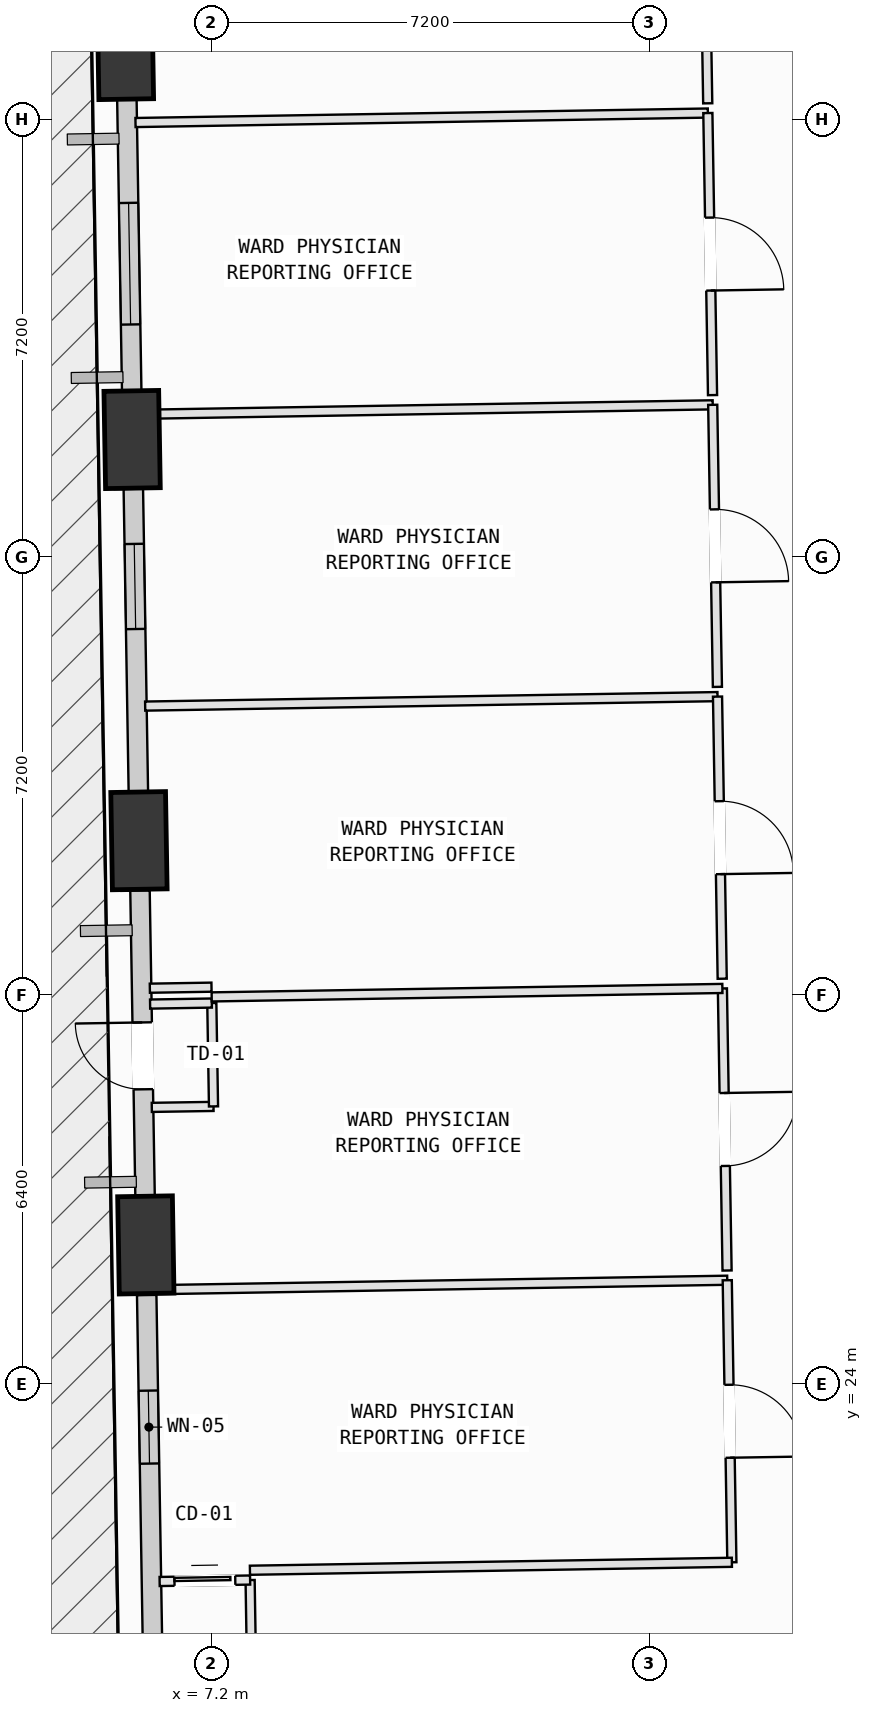
"""IFC4 building model, lengths in metres.
Left out: names, types, materials, properties, quantities, classifications, styles, units other than length and angle.
Written with IfcOpenShell. Run it as: python <this file> out.ifc"""

import sys

from ifc_helpers import new_model, si_unit, direction, frame, frame_2d, origin, origin_2d, place, context, subcontext, project, spatial, rectangle, extrude, element, fill, save


model = new_model("IFC4")
c1 = context("Model", 3, precision=1e-05, world=origin(), true_north=direction((0.0, 1.0)))
c2 = subcontext(c1, "Body", "Model", "MODEL_VIEW")
j1 = project(units=[si_unit("LENGTHUNIT", "METRE"), si_unit("PLANEANGLEUNIT", "RADIAN")], contexts=[c1])
p1 = place(None, origin())
s1 = spatial("IfcSite", under=j1, at=p1, CompositionType="ELEMENT")
p2 = place(p1, origin())
s2 = spatial("IfcBuilding", under=s1, at=p2, CompositionType="ELEMENT")
p3 = place(p2, frame((0.0, 0.0, 27.0)))
s3 = spatial("IfcBuildingStorey", under=s2, at=p3, CompositionType="ELEMENT", Elevation=27.0)
p4 = place(p3, frame((5.785, 45.928, 0.118), z_axis=(-0.085809994835, -0.114766197736, 0.98967942519), x_axis=(0.579277175858, 0.802439382746, 0.143279414254)))
e1 = element("IfcColumn", 1, at=p4, inside=s3, PredefinedType="COLUMN", context=c2, shape_type="SweptSolid", body=[
    extrude(rectangle(XDim=1.6, YDim=0.9, at=origin_2d()), origin(), (0.0, 0.0, 1.0), 3.921),
])
p5 = place(p3, frame((5.895, 39.531, 0.107), z_axis=(-0.059660635977, -0.114344368014, 0.991648109976), x_axis=(0.443956682583, 0.886720367742, 0.128955238049)))
e2 = element("IfcColumn", 2, at=p5, inside=s3, PredefinedType="COLUMN", context=c2, shape_type="SweptSolid", body=[
    extrude(rectangle(XDim=1.6, YDim=0.9, at=origin_2d()), origin(), (0.0, 0.0, 1.0), 3.924),
])
p6 = place(p3, frame((6.008, 32.932, 0.098), z_axis=(-0.032570607455, -0.11381065315, 0.992968423848), x_axis=(0.257225027096, 0.959075298635, 0.11836324169)))
e3 = element("IfcColumn", 3, at=p6, inside=s3, PredefinedType="COLUMN", context=c2, shape_type="SweptSolid", body=[
    extrude(rectangle(XDim=1.6, YDim=0.9, at=origin_2d()), origin(), (0.0, 0.0, 1.0), 3.928),
])
p7 = place(p3, frame((6.121, 26.284, 0.094), z_axis=(-0.005218792741, -0.113198099685, 0.99355873225), x_axis=(0.029189051615, 0.993131654715, 0.113302761082)))
e4 = element("IfcColumn", 4, at=p7, inside=s3, PredefinedType="COLUMN", context=c2, shape_type="SweptSolid", body=[
    extrude(rectangle(XDim=1.6, YDim=0.9, at=origin_2d()), origin(), (0.0, 0.0, 1.0), 3.93),
])
p8 = place(p3, frame((5.896, 39.909, 0.0), z_axis=(0.0, 0.0, 1.0), x_axis=(-0.016593479648, 0.999862318739, 0.0)))
e5 = element("IfcWall", 5, at=p8, inside=s3, PredefinedType="SOLIDWALL", context=c2, shape_type="SweptSolid", body=[
    extrude(rectangle(XDim=5.223, YDim=0.32, at=frame_2d((2.612, 0.0))), origin(), (0.0, 0.0, 1.0), 3.165),
])
p9 = place(p8, frame((1.513, 0.0, 0.75)))
e6 = element("IfcOpeningElement", 6, at=p9, cuts=e5, PredefinedType="OPENING", context=c2, shape_type="SweptSolid", body=[
    extrude(rectangle(XDim=2.0, YDim=1.95, at=frame_2d((1.0, 0.975))), frame((0.0, 0.17, 0.0), z_axis=(0.0, -1.0, 0.0), x_axis=(1.0, 0.0, 0.0)), (0.0, 0.0, 1.0), 0.34),
])
p10 = place(p3, frame((6.005, 33.319, 0.0), z_axis=(0.0, 0.0, 1.0), x_axis=(-0.016590536617, 0.999862367576, 0.0)))
e7 = element("IfcWall", 7, at=p10, inside=s3, PredefinedType="SOLIDWALL", context=c2, shape_type="SweptSolid", body=[
    extrude(rectangle(XDim=5.401, YDim=0.32, at=frame_2d((2.7, 0.0))), origin(), (0.0, 0.0, 1.0), 2.765),
])
p11 = place(p10, frame((3.094, 0.0, 0.75)))
e8 = element("IfcOpeningElement", 8, at=p11, cuts=e7, PredefinedType="OPENING", context=c2, shape_type="SweptSolid", body=[
    extrude(rectangle(XDim=1.4, YDim=1.85, at=frame_2d((0.7, 0.925))), frame((0.0, 0.17, 0.0), z_axis=(0.0, -1.0, 0.0), x_axis=(1.0, 0.0, 0.0)), (0.0, 0.0, 1.0), 0.34),
])
p12 = place(p3, frame((6.115, 26.675, 0.0), z_axis=(0.0, 0.0, 1.0), x_axis=(-0.016566358114, 0.999862768473, 0.0)))
e9 = element("IfcWall", 9, at=p12, inside=s3, PredefinedType="SOLIDWALL", context=c2, shape_type="SweptSolid", body=[
    extrude(rectangle(XDim=5.438, YDim=0.32, at=frame_2d((2.719, 0.0))), origin(), (0.0, 0.0, 1.0), 3.165),
])
p13 = place(p12, frame((2.169, 0.0, 0.0)))
e10 = element("IfcOpeningElement", 10, at=p13, cuts=e9, PredefinedType="OPENING", context=c2, shape_type="SweptSolid", body=[
    extrude(rectangle(XDim=1.1, YDim=2.15, at=frame_2d((0.55, 1.075))), frame((0.0, 0.17, 0.0), z_axis=(0.0, -1.0, 0.0), x_axis=(1.0, 0.0, 0.0)), (0.0, 0.0, 1.0), 0.34),
])
p14 = place(p3, frame((6.254, 18.324, 0.0), z_axis=(0.0, 0.0, 1.0), x_axis=(-0.016592528305, 0.999862334526, 0.0)))
e11 = element("IfcWall", 11, at=p14, inside=s3, PredefinedType="SOLIDWALL", context=c2, shape_type="SweptSolid", body=[
    extrude(rectangle(XDim=7.136, YDim=0.32, at=frame_2d((3.568, 0.0))), origin(), (0.0, 0.0, 1.0), 3.165),
])
p15 = place(p14, frame((4.364, 0.0, 0.75)))
e12 = element("IfcOpeningElement", 12, at=p15, cuts=e11, PredefinedType="OPENING", context=c2, shape_type="SweptSolid", body=[
    extrude(rectangle(XDim=1.2, YDim=1.75, at=frame_2d((0.6, 0.875))), frame((0.0, 0.17, 0.0), z_axis=(0.0, -1.0, 0.0), x_axis=(1.0, 0.0, 0.0)), (0.0, 0.0, 1.0), 0.34),
])
p16 = place(p3, frame((7.836, 20.772, 0.0), z_axis=(0.0, 0.0, 1.0), x_axis=(0.015944501981, -0.999872878348, 0.0)))
e13 = element("IfcWall", 13, at=p16, inside=s3, PredefinedType="PARTITIONING", context=c2, shape_type="SweptSolid", body=[
    extrude(rectangle(XDim=4.639, YDim=0.15, at=frame_2d((2.32, 0.0))), origin(), (0.0, 0.0, 1.0), 3.78),
])
p17 = place(p3, frame((6.348, 20.748, 0.0), z_axis=(0.0, 0.0, 1.0), x_axis=(0.999870761908, 0.016076675089, 0.0)))
e14 = element("IfcWall", 14, at=p17, inside=s3, PredefinedType="PARTITIONING", context=c2, shape_type="SweptSolid", body=[
    extrude(rectangle(XDim=1.488, YDim=0.15, at=frame_2d((0.744, 0.0))), origin(), (0.0, 0.0, 1.0), 3.78),
])
p18 = place(p17, frame((0.244, 0.0, 0.0)))
e15 = element("IfcOpeningElement", 15, at=p18, cuts=e14, PredefinedType="OPENING", context=c2, shape_type="SweptSolid", body=[
    extrude(rectangle(XDim=1.0, YDim=2.12, at=frame_2d((0.5, 1.06))), frame((0.0, 0.085, 0.0), z_axis=(0.0, -1.0, 0.0), x_axis=(1.0, 0.0, 0.0)), (0.0, 0.0, 1.0), 0.17),
])
p19 = place(p3, frame((6.238, 25.547, 0.0), z_axis=(0.0, 0.0, 1.0), x_axis=(0.999864045783, 0.016489085771, 0.0)))
e16 = element("IfcWall", 16, at=p19, inside=s3, PredefinedType="PARTITIONING", context=c2, shape_type="SweptSolid", body=[
    extrude(rectangle(XDim=9.446, YDim=0.15, at=frame_2d((4.723, 0.0))), origin(), (0.0, 0.0, 1.0), 3.78),
])
p20 = place(p3, frame((15.683, 25.703, 0.0), z_axis=(0.0, 0.0, 1.0), x_axis=(0.016365367632, -0.999866078404, 0.0)))
e17 = element("IfcWall", 17, at=p20, inside=s3, PredefinedType="PARTITIONING", context=c2, shape_type="SweptSolid", body=[
    extrude(rectangle(XDim=4.64, YDim=0.15, at=frame_2d((2.32, 0.0))), origin(), (0.0, 0.0, 1.0), 3.78),
])
p21 = place(p20, frame((1.72, 0.0, 0.0)))
e18 = element("IfcOpeningElement", 18, at=p21, cuts=e17, PredefinedType="OPENING", context=c2, shape_type="SweptSolid", body=[
    extrude(rectangle(XDim=1.2, YDim=2.15, at=frame_2d((0.6, 1.075))), frame((0.0, 0.085, 0.0), z_axis=(0.0, -1.0, 0.0), x_axis=(1.0, 0.0, 0.0)), (0.0, 0.0, 1.0), 0.17),
])
p22 = place(p3, frame((15.759, 21.064, 0.0), z_axis=(0.0, 0.0, 1.0), x_axis=(-0.999863736357, -0.016507838062, 0.0)))
e19 = element("IfcWall", 19, at=p22, inside=s3, PredefinedType="PARTITIONING", context=c2, shape_type="SweptSolid", body=[
    extrude(rectangle(XDim=7.927, YDim=0.15, at=frame_2d((3.963, 0.0))), origin(), (0.0, 0.0, 1.0), 3.78),
])
p23 = place(p3, frame((15.603, 30.502, 0.0), z_axis=(0.0, 0.0, 1.0), x_axis=(0.01657579721, -0.999862612036, 0.0)))
e20 = element("IfcWall", 20, at=p23, inside=s3, PredefinedType="PARTITIONING", context=c2, shape_type="SweptSolid", body=[
    extrude(rectangle(XDim=4.64, YDim=0.15, at=frame_2d((2.32, 0.0))), origin(), (0.0, 0.0, 1.0), 3.78),
])
p24 = place(p23, frame((1.72, 0.0, 0.0)))
e21 = element("IfcOpeningElement", 21, at=p24, cuts=e20, PredefinedType="OPENING", context=c2, shape_type="SweptSolid", body=[
    extrude(rectangle(XDim=1.2, YDim=2.15, at=frame_2d((0.6, 1.075))), frame((0.0, 0.085, 0.0), z_axis=(0.0, -1.0, 0.0), x_axis=(1.0, 0.0, 0.0)), (0.0, 0.0, 1.0), 0.17),
])
p25 = place(p3, frame((5.901, 25.701, 0.0), z_axis=(0.0, 0.0, 1.0), x_axis=(-0.016358243814, 0.999866194978, 0.0)))
e22 = element("IfcWall", 22, at=p25, inside=s3, PredefinedType="PARTITIONING", context=c2, shape_type="SweptSolid", body=[
    extrude(rectangle(XDim=0.97, YDim=0.15, at=frame_2d((0.485, 0.0))), origin(), (0.0, 0.0, 1.0), 3.165),
])
p26 = place(p3, frame((6.219, 28.546, 0.0), z_axis=(0.0, 0.0, 1.0), x_axis=(0.99987398689, 0.015874833566, 0.0)))
e23 = element("IfcWall", 23, at=p26, inside=s3, PredefinedType="PARTITIONING", context=c2, shape_type="SweptSolid", body=[
    extrude(rectangle(XDim=1.015, YDim=0.15, at=frame_2d((0.508, 0.0))), origin(), (0.0, 0.0, 1.0), 3.78),
])
p27 = place(p3, frame((7.234, 28.562, 0.0), z_axis=(0.0, 0.0, 1.0), x_axis=(-0.016370059483, 0.999866001598, 0.0)))
e24 = element("IfcWall", 24, at=p27, inside=s3, PredefinedType="PARTITIONING", context=c2, shape_type="SweptSolid", body=[
    extrude(rectangle(XDim=1.7, YDim=0.15, at=frame_2d((0.85, 0.0))), origin(), (0.0, 0.0, 1.0), 3.78),
])
p28 = place(p3, frame((7.206, 30.262, 0.0), z_axis=(0.0, 0.0, 1.0), x_axis=(-0.99986233944, -0.016592232184, 0.0)))
e25 = element("IfcWall", 25, at=p28, inside=s3, PredefinedType="PARTITIONING", context=c2, shape_type="SweptSolid", body=[
    extrude(rectangle(XDim=1.015, YDim=0.15, at=frame_2d((0.508, 0.0))), origin(), (0.0, 0.0, 1.0), 3.78),
])
p29 = place(p3, frame((7.204, 30.363, 0.0), z_axis=(0.0, 0.0, 1.0), x_axis=(0.999863246623, 0.016537474197, 0.0)))
e26 = element("IfcWall", 26, at=p29, inside=s3, PredefinedType="PARTITIONING", context=c2, shape_type="SweptSolid", body=[
    extrude(rectangle(XDim=8.4, YDim=0.15, at=frame_2d((4.2, 0.0))), origin(), (0.0, 0.0, 1.0), 3.78),
])
p30 = place(p3, frame((6.11, 35.146, 0.0), z_axis=(0.0, 0.0, 1.0), x_axis=(0.999862684094, 0.01657145001, 0.0)))
e27 = element("IfcWall", 27, at=p30, inside=s3, PredefinedType="PARTITIONING", context=c2, shape_type="SweptSolid", body=[
    extrude(rectangle(XDim=9.414, YDim=0.15, at=frame_2d((4.707, 0.0))), origin(), (0.0, 0.0, 1.0), 3.78),
])
p31 = place(p3, frame((15.523, 35.302, 0.0), z_axis=(0.0, 0.0, 1.0), x_axis=(0.016624905433, -0.99986179671, 0.0)))
e28 = element("IfcWall", 28, at=p31, inside=s3, PredefinedType="PARTITIONING", context=c2, shape_type="SweptSolid", body=[
    extrude(rectangle(XDim=4.641, YDim=0.15, at=frame_2d((2.32, 0.0))), origin(), (0.0, 0.0, 1.0), 2.765),
])
p32 = place(p31, frame((1.72, 0.0, 0.0)))
e29 = element("IfcOpeningElement", 29, at=p32, cuts=e28, PredefinedType="OPENING", context=c2, shape_type="SweptSolid", body=[
    extrude(rectangle(XDim=1.2, YDim=2.15, at=frame_2d((0.6, 1.075))), frame((0.0, 0.085, 0.0), z_axis=(0.0, -1.0, 0.0), x_axis=(1.0, 0.0, 0.0)), (0.0, 0.0, 1.0), 0.17),
])
p33 = place(p3, frame((7.201, 30.523, 0.0), z_axis=(0.0, 0.0, 1.0), x_axis=(-0.999862007837, -0.016612202875, 0.0)))
e30 = element("IfcWall", 30, at=p33, inside=s3, PredefinedType="PARTITIONING", context=c2, shape_type="SweptSolid", body=[
    extrude(rectangle(XDim=1.014, YDim=0.15, at=frame_2d((0.507, 0.0))), origin(), (0.0, 0.0, 1.0), 3.78),
])
p34 = place(p3, frame((5.795, 32.108, 0.0), z_axis=(0.0, 0.0, 1.0), x_axis=(-0.016570077195, 0.999862706846, 0.0)))
e31 = element("IfcWall", 31, at=p34, inside=s3, PredefinedType="PARTITIONING", context=c2, shape_type="SweptSolid", body=[
    extrude(rectangle(XDim=1.208, YDim=0.15, at=frame_2d((0.604, 0.0))), origin(), (0.0, 0.0, 1.0), 3.165),
])
p35 = place(p3, frame((6.03, 39.945, 0.0), z_axis=(0.0, 0.0, 1.0), x_axis=(0.999862719696, 0.016569301812, 0.0)))
e32 = element("IfcWall", 32, at=p35, inside=s3, PredefinedType="PARTITIONING", context=c2, shape_type="SweptSolid", body=[
    extrude(rectangle(XDim=9.415, YDim=0.15, at=frame_2d((4.708, 0.0))), origin(), (0.0, 0.0, 1.0), 3.78),
])
p36 = place(p3, frame((15.444, 40.101, 0.0), z_axis=(0.0, 0.0, 1.0), x_axis=(0.016574925131, -0.999862626493, 0.0)))
e33 = element("IfcWall", 33, at=p36, inside=s3, PredefinedType="PARTITIONING", context=c2, shape_type="SweptSolid", body=[
    extrude(rectangle(XDim=4.64, YDim=0.15, at=frame_2d((2.32, 0.0))), origin(), (0.0, 0.0, 1.0), 2.765),
])
p37 = place(p36, frame((1.72, 0.0, 0.0)))
e34 = element("IfcOpeningElement", 34, at=p37, cuts=e33, PredefinedType="OPENING", context=c2, shape_type="SweptSolid", body=[
    extrude(rectangle(XDim=1.2, YDim=2.15, at=frame_2d((0.6, 1.075))), frame((0.0, 0.085, 0.0), z_axis=(0.0, -1.0, 0.0), x_axis=(1.0, 0.0, 0.0)), (0.0, 0.0, 1.0), 0.17),
])
p38 = place(p3, frame((5.685, 38.715, 0.0), z_axis=(0.0, 0.0, 1.0), x_axis=(-0.016001233857, 0.999871972062, 0.0)))
e35 = element("IfcWall", 35, at=p38, inside=s3, PredefinedType="PARTITIONING", context=c2, shape_type="SweptSolid", body=[
    extrude(rectangle(XDim=1.19, YDim=0.15, at=frame_2d((0.595, 0.0))), origin(), (0.0, 0.0, 1.0), 2.765),
])
p39 = place(p3, frame((5.951, 44.744, 0.0), z_axis=(0.0, 0.0, 1.0), x_axis=(0.999862691216, 0.016571020326, 0.0)))
e36 = element("IfcWall", 36, at=p39, inside=s3, PredefinedType="PARTITIONING", context=c2, shape_type="SweptSolid", body=[
    extrude(rectangle(XDim=9.414, YDim=0.15, at=frame_2d((4.707, 0.0))), origin(), (0.0, 0.0, 1.0), 3.78),
])
p40 = place(p3, frame((15.364, 44.9, 0.0), z_axis=(0.0, 0.0, 1.0), x_axis=(0.01657579721, -0.999862612036, 0.0)))
e37 = element("IfcWall", 37, at=p40, inside=s3, PredefinedType="PARTITIONING", context=c2, shape_type="SweptSolid", body=[
    extrude(rectangle(XDim=4.64, YDim=0.15, at=frame_2d((2.32, 0.0))), origin(), (0.0, 0.0, 1.0), 2.765),
])
p41 = place(p40, frame((1.72, 0.0, 0.0)))
e38 = element("IfcOpeningElement", 38, at=p41, cuts=e37, PredefinedType="OPENING", context=c2, shape_type="SweptSolid", body=[
    extrude(rectangle(XDim=1.2, YDim=2.15, at=frame_2d((0.6, 1.075))), frame((0.0, 0.085, 0.0), z_axis=(0.0, -1.0, 0.0), x_axis=(1.0, 0.0, 0.0)), (0.0, 0.0, 1.0), 0.17),
])
p42 = place(p3, frame((15.284, 49.79, 0.0), z_axis=(0.0, 0.0, 1.0), x_axis=(0.016514728978, -0.999863622564, 0.0)))
e39 = element("IfcWall", 39, at=p42, inside=s3, PredefinedType="PARTITIONING", context=c2, shape_type="SweptSolid", body=[
    extrude(rectangle(XDim=4.731, YDim=0.15, at=frame_2d((2.365, 0.0))), origin(), (0.0, 0.0, 1.0), 3.78),
])
p43 = place(p42, frame((1.89, 0.0, 0.0)))
e40 = element("IfcOpeningElement", 40, at=p43, cuts=e39, PredefinedType="OPENING", context=c2, shape_type="SweptSolid", body=[
    extrude(rectangle(XDim=1.2, YDim=2.15, at=frame_2d((0.6, 1.075))), frame((0.0, 0.085, 0.0), z_axis=(0.0, -1.0, 0.0), x_axis=(1.0, 0.0, 0.0)), (0.0, 0.0, 1.0), 0.17),
])
p44 = place(p3, frame((5.579, 45.128, 0.0), z_axis=(0.0, 0.0, 1.0), x_axis=(-0.016789502325, 0.999859046372, 0.0)))
e41 = element("IfcWall", 41, at=p44, inside=s3, PredefinedType="PARTITIONING", context=c2, shape_type="SweptSolid", body=[
    extrude(rectangle(XDim=2.21, YDim=0.15, at=frame_2d((1.105, 0.0))), origin(), (0.0, 0.0, 1.0), 3.165),
])
p45 = place(p13, origin())
e42 = element("IfcDoor", 42, at=p45, inside=s3, OperationType="SINGLE_SWING_RIGHT", PredefinedType="DOOR", context=c2, shape_type="SweptSolid", body=[
    extrude(rectangle(XDim=1.1, YDim=2.15, at=frame_2d((0.55, 1.075))), frame((0.0, 0.025, 0.0), z_axis=(0.0, -1.0, 0.0), x_axis=(1.0, 0.0, 0.0)), (0.0, 0.0, 1.0), 0.05),
])
fill(e10, e42)
p46 = place(p9, origin())
e43 = element("IfcWindow", 43, at=p46, inside=s3, PartitioningType="SINGLE_PANEL", PredefinedType="WINDOW", context=c2, shape_type="SweptSolid", body=[
    extrude(rectangle(XDim=2.0, YDim=1.95, at=frame_2d((1.0, 0.975))), frame((0.0, 0.03, 0.0), z_axis=(0.0, -1.0, 0.0), x_axis=(1.0, 0.0, 0.0)), (0.0, 0.0, 1.0), 0.06),
])
fill(e6, e43)
p47 = place(p11, origin())
e44 = element("IfcWindow", 44, at=p47, inside=s3, PartitioningType="SINGLE_PANEL", PredefinedType="WINDOW", context=c2, shape_type="SweptSolid", body=[
    extrude(rectangle(XDim=1.4, YDim=1.85, at=frame_2d((0.7, 0.925))), frame((0.0, 0.03, 0.0), z_axis=(0.0, -1.0, 0.0), x_axis=(1.0, 0.0, 0.0)), (0.0, 0.0, 1.0), 0.06),
])
fill(e8, e44)
p48 = place(p15, origin())
e45 = element("IfcWindow", 45, at=p48, inside=s3, PartitioningType="SINGLE_PANEL", PredefinedType="WINDOW", context=c2, shape_type="SweptSolid", body=[
    extrude(rectangle(XDim=1.2, YDim=1.75, at=frame_2d((0.6, 0.875))), frame((0.0, 0.03, 0.0), z_axis=(0.0, -1.0, 0.0), x_axis=(1.0, 0.0, 0.0)), (0.0, 0.0, 1.0), 0.06),
])
fill(e12, e45)
p49 = place(p21, origin())
e46 = element("IfcDoor", 46, at=p49, inside=s3, OperationType="SINGLE_SWING_RIGHT", PredefinedType="DOOR", context=c2, shape_type="SweptSolid", body=[
    extrude(rectangle(XDim=1.2, YDim=2.15, at=frame_2d((0.6, 1.075))), frame((0.0, 0.025, 0.0), z_axis=(0.0, -1.0, 0.0), x_axis=(1.0, 0.0, 0.0)), (0.0, 0.0, 1.0), 0.05),
])
fill(e18, e46)
p50 = place(p24, origin())
e47 = element("IfcDoor", 47, at=p50, inside=s3, OperationType="SINGLE_SWING_LEFT", PredefinedType="DOOR", context=c2, shape_type="SweptSolid", body=[
    extrude(rectangle(XDim=1.2, YDim=2.15, at=frame_2d((0.6, 1.075))), frame((0.0, 0.025, 0.0), z_axis=(0.0, -1.0, 0.0), x_axis=(1.0, 0.0, 0.0)), (0.0, 0.0, 1.0), 0.05),
])
fill(e21, e47)
p51 = place(p32, origin())
e48 = element("IfcDoor", 48, at=p51, inside=s3, OperationType="SINGLE_SWING_RIGHT", PredefinedType="DOOR", context=c2, shape_type="SweptSolid", body=[
    extrude(rectangle(XDim=1.2, YDim=2.15, at=frame_2d((0.6, 1.075))), frame((0.0, 0.025, 0.0), z_axis=(0.0, -1.0, 0.0), x_axis=(1.0, 0.0, 0.0)), (0.0, 0.0, 1.0), 0.05),
])
fill(e29, e48)
p52 = place(p37, origin())
e49 = element("IfcDoor", 49, at=p52, inside=s3, OperationType="SINGLE_SWING_RIGHT", PredefinedType="DOOR", context=c2, shape_type="SweptSolid", body=[
    extrude(rectangle(XDim=1.2, YDim=2.15, at=frame_2d((0.6, 1.075))), frame((0.0, 0.025, 0.0), z_axis=(0.0, -1.0, 0.0), x_axis=(1.0, 0.0, 0.0)), (0.0, 0.0, 1.0), 0.05),
])
fill(e34, e49)
p53 = place(p41, origin())
e50 = element("IfcDoor", 50, at=p53, inside=s3, OperationType="SINGLE_SWING_RIGHT", PredefinedType="DOOR", context=c2, shape_type="SweptSolid", body=[
    extrude(rectangle(XDim=1.2, YDim=2.15, at=frame_2d((0.6, 1.075))), frame((0.0, 0.025, 0.0), z_axis=(0.0, -1.0, 0.0), x_axis=(1.0, 0.0, 0.0)), (0.0, 0.0, 1.0), 0.05),
])
fill(e38, e50)
p54 = place(p18, origin())
e51 = element("IfcDoor", 51, at=p54, inside=s3, OperationType="SLIDING_TO_LEFT", PredefinedType="DOOR", context=c2, shape_type="SweptSolid", body=[
    extrude(rectangle(XDim=1.0, YDim=2.12, at=frame_2d((0.5, 1.06))), frame((0.0, 0.025, 0.0), z_axis=(0.0, -1.0, 0.0), x_axis=(1.0, 0.0, 0.0)), (0.0, 0.0, 1.0), 0.05),
])
fill(e15, e51)
save(model, sys.argv[1])
